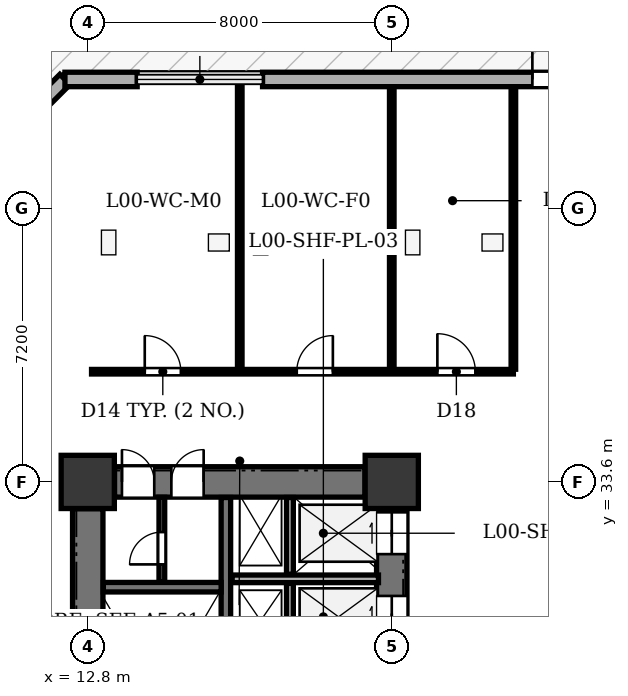
"""IFC4 building model, lengths in metres.
Left out: names, types, materials, properties, quantities, classifications, styles, units other than length and angle.
Written with IfcOpenShell. Run it as: python <this file> out.ifc"""

import sys

from ifc_helpers import new_model, si_unit, direction, frame, frame_2d, origin, origin_2d, place, context, subcontext, project, spatial, rectangle, extrude, element, fill, save


model = new_model("IFC4")
c1 = context("Model", 3, precision=1e-05, world=origin(), true_north=direction((0.0, 1.0)))
c2 = subcontext(c1, "Body", "Model", "MODEL_VIEW")
j1 = project(units=[si_unit("LENGTHUNIT", "METRE"), si_unit("PLANEANGLEUNIT", "RADIAN")], contexts=[c1])
p1 = place(None, origin())
s1 = spatial("IfcSite", under=j1, at=p1, CompositionType="ELEMENT")
p2 = place(p1, origin())
s2 = spatial("IfcBuilding", under=s1, at=p2, CompositionType="ELEMENT")
p3 = place(p2, origin())
s3 = spatial("IfcBuildingStorey", under=s2, at=p3, CompositionType="ELEMENT", Elevation=0.0)
for number, where, z_axis, x_axis in (
    (1, (12.8, 33.6, 0.0), (0.0, 0.0, 1.0), (1.0, 0.0, 0.0)),
    (2, (20.8, 33.6, 0.0), (0.0, 0.0, 1.0), (1.0, 0.0, 0.0)),
):
    element("IfcColumn", number, at=place(p3, frame(where, z_axis=z_axis, x_axis=x_axis)), inside=s3, PredefinedType="COLUMN", context=c2, shape_type="SweptSolid", body=[
        extrude(rectangle(XDim=1.4, YDim=1.4, at=origin_2d()), origin(), (0.0, 0.0, 1.0), 5.4),
    ])
p4 = place(p3, frame((9.41, 41.4, 0.0), z_axis=(0.0, 0.0, 1.0), x_axis=(0.707106781187, 0.707106781187, 0.0)))
e3 = element("IfcWall", 3, at=p4, inside=s3, PredefinedType="STANDARD", context=c2, shape_type="SweptSolid", body=[
    extrude(rectangle(XDim=3.946, YDim=0.38, at=frame_2d((1.973, 0.0))), origin(), (0.0, 0.0, 1.0), 4.95),
])
p5 = place(p3, frame((12.2, 44.19, 0.0), z_axis=(0.0, 0.0, 1.0), x_axis=(1.0, 0.0, 0.0)))
e4 = element("IfcWall", 4, at=p5, inside=s3, PredefinedType="STANDARD", context=c2, shape_type="SweptSolid", body=[
    extrude(rectangle(XDim=1.9, YDim=0.38, at=frame_2d((0.95, 0.0))), origin(), (0.0, 0.0, 1.0), 3.135),
])
p6 = place(p3, frame((17.4, 44.19, 0.0), z_axis=(0.0, 0.0, 1.0), x_axis=(1.0, 0.0, 0.0)))
e5 = element("IfcWall", 5, at=p6, inside=s3, PredefinedType="STANDARD", context=c2, shape_type="SweptSolid", body=[
    extrude(rectangle(XDim=12.55, YDim=0.38, at=frame_2d((6.275, 0.0))), origin(), (0.0, 0.0, 1.0), 3.135),
])
p7 = place(p6, frame((7.1, 0.0, 0.0)))
e6 = element("IfcOpeningElement", 6, at=p7, cuts=e5, PredefinedType="OPENING", context=c2, shape_type="SweptSolid", body=[
    extrude(rectangle(XDim=1.8, YDim=2.3, at=frame_2d((0.9, 1.15))), frame((0.0, 0.2, 0.0), z_axis=(0.0, -1.0, 0.0), x_axis=(1.0, 0.0, 0.0)), (0.0, 0.0, 1.0), 0.4),
])
p8 = place(p3, frame((12.8, 21.505, 0.0), z_axis=(0.0, 0.0, 1.0), x_axis=(0.0, 1.0, 0.0)))
e7 = element("IfcWall", 7, at=p8, inside=s3, PredefinedType="SHEAR", context=c2, shape_type="SweptSolid", body=[
    extrude(rectangle(XDim=11.39, YDim=0.8, at=frame_2d((5.695, 0.0))), origin(), (0.0, 0.0, 1.0), 4.95),
])
p9 = place(p8, frame((2.345, 0.0, 0.0)))
e8 = element("IfcOpeningElement", 8, at=p9, cuts=e7, PredefinedType="OPENING", context=c2, shape_type="SweptSolid", body=[
    extrude(rectangle(XDim=1.15, YDim=2.15, at=frame_2d((0.575, 1.075))), frame((0.0, 0.41, 0.0), z_axis=(0.0, -1.0, 0.0), x_axis=(1.0, 0.0, 0.0)), (0.0, 0.0, 1.0), 0.82),
])
p10 = place(p3, frame((13.505, 33.6, 0.0), z_axis=(0.0, 0.0, 1.0), x_axis=(1.0, 0.0, 0.0)))
e9 = element("IfcWall", 9, at=p10, inside=s3, PredefinedType="SHEAR", context=c2, shape_type="SweptSolid", body=[
    extrude(rectangle(XDim=6.59, YDim=0.8, at=frame_2d((3.295, 0.0))), origin(), (0.0, 0.0, 1.0), 4.95),
])
p11 = place(p10, frame((0.195, 0.0, 0.0)))
e10 = element("IfcOpeningElement", 10, at=p11, cuts=e9, PredefinedType="OPENING", context=c2, shape_type="SweptSolid", body=[
    extrude(rectangle(XDim=0.85, YDim=2.02, at=frame_2d((0.425, 1.01))), frame((0.0, 0.41, 0.0), z_axis=(0.0, -1.0, 0.0), x_axis=(1.0, 0.0, 0.0)), (0.0, 0.0, 1.0), 0.82),
])
p12 = place(p10, frame((1.495, 0.0, 0.0)))
e11 = element("IfcOpeningElement", 11, at=p12, cuts=e9, PredefinedType="OPENING", context=c2, shape_type="SweptSolid", body=[
    extrude(rectangle(XDim=0.85, YDim=2.02, at=frame_2d((0.425, 1.01))), frame((0.0, 0.41, 0.0), z_axis=(0.0, -1.0, 0.0), x_axis=(1.0, 0.0, 0.0)), (0.0, 0.0, 1.0), 0.82),
])
p13 = place(p3, frame((20.8, 21.505, 0.0), z_axis=(0.0, 0.0, 1.0), x_axis=(0.0, 1.0, 0.0)))
e12 = element("IfcWall", 12, at=p13, inside=s3, PredefinedType="SHEAR", context=c2, shape_type="SweptSolid", body=[
    extrude(rectangle(XDim=11.39, YDim=0.8, at=frame_2d((5.695, 0.0))), origin(), (0.0, 0.0, 1.0), 4.95),
])
p14 = place(p13, frame((1.095, 0.0, 0.0)))
e13 = element("IfcOpeningElement", 13, at=p14, cuts=e12, PredefinedType="OPENING", context=c2, shape_type="SweptSolid", body=[
    extrude(rectangle(XDim=1.2, YDim=2.15, at=frame_2d((0.6, 1.075))), frame((0.0, 0.41, 0.0), z_axis=(0.0, -1.0, 0.0), x_axis=(1.0, 0.0, 0.0)), (0.0, 0.0, 1.0), 0.82),
])
p15 = place(p13, frame((4.095, 0.0, 0.0)))
e14 = element("IfcOpeningElement", 14, at=p15, cuts=e12, PredefinedType="OPENING", context=c2, shape_type="SweptSolid", body=[
    extrude(rectangle(XDim=1.1, YDim=2.1, at=frame_2d((0.55, 1.05))), frame((0.0, 0.41, 0.0), z_axis=(0.0, -1.0, 0.0), x_axis=(1.0, 0.0, 0.0)), (0.0, 0.0, 1.0), 0.82),
])
p16 = place(p13, frame((6.045, 0.0, 0.0)))
e15 = element("IfcOpeningElement", 15, at=p16, cuts=e12, PredefinedType="OPENING", context=c2, shape_type="SweptSolid", body=[
    extrude(rectangle(XDim=1.1, YDim=2.1, at=frame_2d((0.55, 1.05))), frame((0.0, 0.41, 0.0), z_axis=(0.0, -1.0, 0.0), x_axis=(1.0, 0.0, 0.0)), (0.0, 0.0, 1.0), 0.82),
])
p17 = place(p13, frame((7.995, 0.0, 0.0)))
e16 = element("IfcOpeningElement", 16, at=p17, cuts=e12, PredefinedType="OPENING", context=c2, shape_type="SweptSolid", body=[
    extrude(rectangle(XDim=1.1, YDim=2.1, at=frame_2d((0.55, 1.05))), frame((0.0, 0.41, 0.0), z_axis=(0.0, -1.0, 0.0), x_axis=(1.0, 0.0, 0.0)), (0.0, 0.0, 1.0), 0.82),
])
p18 = place(p13, frame((10.195, 0.0, 0.0)))
e17 = element("IfcOpeningElement", 17, at=p18, cuts=e12, PredefinedType="OPENING", context=c2, shape_type="SweptSolid", body=[
    extrude(rectangle(XDim=1.1, YDim=2.1, at=frame_2d((0.55, 1.05))), frame((0.0, 0.41, 0.0), z_axis=(0.0, -1.0, 0.0), x_axis=(1.0, 0.0, 0.0)), (0.0, 0.0, 1.0), 0.82),
])
p19 = place(p3, frame((16.435, 21.21, 0.0), z_axis=(0.0, 0.0, 1.0), x_axis=(0.0, 1.0, 0.0)))
e18 = element("IfcWall", 18, at=p19, inside=s3, PredefinedType="SHEAR", context=c2, shape_type="SweptSolid", body=[
    extrude(rectangle(XDim=11.98, YDim=0.25, at=frame_2d((5.99, 0.0))), origin(), (0.0, 0.0, 1.0), 4.95),
])
p20 = place(p19, frame((0.44, 0.0, 0.0)))
e19 = element("IfcOpeningElement", 19, at=p20, cuts=e18, PredefinedType="OPENING", context=c2, shape_type="SweptSolid", body=[
    extrude(rectangle(XDim=1.2, YDim=2.15, at=frame_2d((0.6, 1.075))), frame((0.0, 0.135, 0.0), z_axis=(0.0, -1.0, 0.0), x_axis=(1.0, 0.0, 0.0)), (0.0, 0.0, 1.0), 0.27),
])
p21 = place(p19, frame((2.59, 0.0, 0.0)))
e20 = element("IfcOpeningElement", 20, at=p21, cuts=e18, PredefinedType="OPENING", context=c2, shape_type="SweptSolid", body=[
    extrude(rectangle(XDim=1.15, YDim=2.15, at=frame_2d((0.575, 1.075))), frame((0.0, 0.135, 0.0), z_axis=(0.0, -1.0, 0.0), x_axis=(1.0, 0.0, 0.0)), (0.0, 0.0, 1.0), 0.27),
])
p22 = place(p3, frame((13.21, 30.83, 0.0), z_axis=(0.0, 0.0, 1.0), x_axis=(1.0, 0.0, 0.0)))
e21 = element("IfcWall", 21, at=p22, inside=s3, PredefinedType="SHEAR", context=c2, shape_type="SweptSolid", body=[
    extrude(rectangle(XDim=3.1, YDim=0.25, at=frame_2d((1.55, 0.0))), origin(), (0.0, 0.0, 1.0), 4.95),
])
p23 = place(p3, frame((16.6, 31.05, 0.0), z_axis=(0.0, 0.0, 1.0), x_axis=(1.0, 0.0, 0.0)))
e22 = element("IfcWall", 22, at=p23, inside=s3, PredefinedType="SOLIDWALL", context=c2, shape_type="SweptSolid", body=[
    extrude(rectangle(XDim=3.85, YDim=0.2, at=frame_2d((1.925, 0.0))), origin(), (0.0, 0.0, 1.0), 4.95),
])
p24 = place(p3, frame((18.12, 25.27, 0.0), z_axis=(0.0, 0.0, 1.0), x_axis=(0.0, 1.0, 0.0)))
e23 = element("IfcWall", 23, at=p24, inside=s3, PredefinedType="PARTITIONING", context=c2, shape_type="SweptSolid", body=[
    extrude(rectangle(XDim=5.66, YDim=0.18, at=frame_2d((2.83, 0.0))), origin(), (0.0, 0.0, 1.0), 4.95),
])
p25 = place(p3, frame((18.12, 31.17, 0.0), z_axis=(0.0, 0.0, 1.0), x_axis=(0.0, 1.0, 0.0)))
e24 = element("IfcWall", 24, at=p25, inside=s3, PredefinedType="PARTITIONING", context=c2, shape_type="SweptSolid", body=[
    extrude(rectangle(XDim=2.02, YDim=0.18, at=frame_2d((1.01, 0.0))), origin(), (0.0, 0.0, 1.0), 4.95),
])
p26 = place(p3, frame((14.75, 30.96, 0.0), z_axis=(0.0, 0.0, 1.0), x_axis=(0.0, 1.0, 0.0)))
e25 = element("IfcWall", 25, at=p26, inside=s3, PredefinedType="PARTITIONING", context=c2, shape_type="SweptSolid", body=[
    extrude(rectangle(XDim=2.235, YDim=0.15, at=frame_2d((1.118, 0.0))), origin(), (0.0, 0.0, 1.0), 4.95),
])
p27 = place(p26, frame((0.47, 0.0, 0.0)))
e26 = element("IfcOpeningElement", 26, at=p27, cuts=e25, PredefinedType="OPENING", context=c2, shape_type="SweptSolid", body=[
    extrude(rectangle(XDim=0.85, YDim=2.02, at=frame_2d((0.425, 1.01))), frame((0.0, 0.085, 0.0), z_axis=(0.0, -1.0, 0.0), x_axis=(1.0, 0.0, 0.0)), (0.0, 0.0, 1.0), 0.17),
])
p28 = place(p3, frame((12.9, 36.5, 0.0), z_axis=(0.0, 0.0, 1.0), x_axis=(1.0, 0.0, 0.0)))
e27 = element("IfcWall", 27, at=p28, inside=s3, PredefinedType="PARTITIONING", context=c2, shape_type="SweptSolid", body=[
    extrude(rectangle(XDim=11.1, YDim=0.12, at=frame_2d((5.55, 0.0))), origin(), (0.0, 0.0, 1.0), 4.95),
])
p29 = place(p28, frame((1.4, 0.0, 0.0)))
e28 = element("IfcOpeningElement", 28, at=p29, cuts=e27, PredefinedType="OPENING", context=c2, shape_type="SweptSolid", body=[
    extrude(rectangle(XDim=0.95, YDim=2.1, at=frame_2d((0.475, 1.05))), frame((0.0, 0.07, 0.0), z_axis=(0.0, -1.0, 0.0), x_axis=(1.0, 0.0, 0.0)), (0.0, 0.0, 1.0), 0.14),
])
p30 = place(p28, frame((5.4, 0.0, 0.0)))
e29 = element("IfcOpeningElement", 29, at=p30, cuts=e27, PredefinedType="OPENING", context=c2, shape_type="SweptSolid", body=[
    extrude(rectangle(XDim=0.95, YDim=2.1, at=frame_2d((0.475, 1.05))), frame((0.0, 0.07, 0.0), z_axis=(0.0, -1.0, 0.0), x_axis=(1.0, 0.0, 0.0)), (0.0, 0.0, 1.0), 0.14),
])
p31 = place(p28, frame((9.1, 0.0, 0.0)))
e30 = element("IfcOpeningElement", 30, at=p31, cuts=e27, PredefinedType="OPENING", context=c2, shape_type="SweptSolid", body=[
    extrude(rectangle(XDim=1.0, YDim=2.1, at=frame_2d((0.5, 1.05))), frame((0.0, 0.07, 0.0), z_axis=(0.0, -1.0, 0.0), x_axis=(1.0, 0.0, 0.0)), (0.0, 0.0, 1.0), 0.14),
])
p32 = place(p3, frame((16.8, 36.58, 0.0), z_axis=(0.0, 0.0, 1.0), x_axis=(0.0, 1.0, 0.0)))
e31 = element("IfcWall", 31, at=p32, inside=s3, PredefinedType="PARTITIONING", context=c2, shape_type="SweptSolid", body=[
    extrude(rectangle(XDim=7.495, YDim=0.12, at=frame_2d((3.748, 0.0))), origin(), (0.0, 0.0, 1.0), 4.95),
])
p33 = place(p3, frame((20.8, 36.58, 0.0), z_axis=(0.0, 0.0, 1.0), x_axis=(0.0, 1.0, 0.0)))
e32 = element("IfcWall", 32, at=p33, inside=s3, PredefinedType="PARTITIONING", context=c2, shape_type="SweptSolid", body=[
    extrude(rectangle(XDim=7.415, YDim=0.12, at=frame_2d((3.708, 0.0))), origin(), (0.0, 0.0, 1.0), 3.135),
])
p34 = place(p3, frame((24.0, 36.565, 0.0), z_axis=(0.0, 0.0, 1.0), x_axis=(0.0, 1.0, 0.0)))
e33 = element("IfcWall", 33, at=p34, inside=s3, PredefinedType="PARTITIONING", context=c2, shape_type="SweptSolid", body=[
    extrude(rectangle(XDim=7.43, YDim=0.12, at=frame_2d((3.715, 0.0))), origin(), (0.0, 0.0, 1.0), 4.95),
])
p35 = place(p7, origin())
e34 = element("IfcDoor", 34, at=p35, inside=s3, OperationType="DOUBLE_DOOR_SINGLE_SWING", PredefinedType="DOOR", context=c2, shape_type="SweptSolid", body=[
    extrude(rectangle(XDim=1.8, YDim=2.3, at=frame_2d((0.9, 1.15))), frame((0.0, 0.025, 0.0), z_axis=(0.0, -1.0, 0.0), x_axis=(1.0, 0.0, 0.0)), (0.0, 0.0, 1.0), 0.05),
])
fill(e6, e34)
p36 = place(p11, origin())
e35 = element("IfcDoor", 35, at=p36, inside=s3, OperationType="SINGLE_SWING_LEFT", PredefinedType="DOOR", context=c2, shape_type="SweptSolid", body=[
    extrude(rectangle(XDim=0.85, YDim=2.02, at=frame_2d((0.425, 1.01))), frame((0.0, 0.025, 0.0), z_axis=(0.0, -1.0, 0.0), x_axis=(1.0, 0.0, 0.0)), (0.0, 0.0, 1.0), 0.05),
])
fill(e10, e35)
p37 = place(p12, origin())
e36 = element("IfcDoor", 36, at=p37, inside=s3, OperationType="SINGLE_SWING_RIGHT", PredefinedType="DOOR", context=c2, shape_type="SweptSolid", body=[
    extrude(rectangle(XDim=0.85, YDim=2.02, at=frame_2d((0.425, 1.01))), frame((0.0, 0.025, 0.0), z_axis=(0.0, -1.0, 0.0), x_axis=(1.0, 0.0, 0.0)), (0.0, 0.0, 1.0), 0.05),
])
fill(e11, e36)
p38 = place(p17, origin())
e37 = element("IfcDoor", 37, at=p38, inside=s3, OperationType="DOUBLE_DOOR_SLIDING", PredefinedType="DOOR", context=c2, shape_type="SweptSolid", body=[
    extrude(rectangle(XDim=1.1, YDim=2.1, at=frame_2d((0.55, 1.05))), frame((0.0, 0.025, 0.0), z_axis=(0.0, -1.0, 0.0), x_axis=(1.0, 0.0, 0.0)), (0.0, 0.0, 1.0), 0.05),
])
fill(e16, e37)
p39 = place(p18, origin())
e38 = element("IfcDoor", 38, at=p39, inside=s3, OperationType="DOUBLE_DOOR_SLIDING", PredefinedType="DOOR", context=c2, shape_type="SweptSolid", body=[
    extrude(rectangle(XDim=1.1, YDim=2.1, at=frame_2d((0.55, 1.05))), frame((0.0, 0.025, 0.0), z_axis=(0.0, -1.0, 0.0), x_axis=(1.0, 0.0, 0.0)), (0.0, 0.0, 1.0), 0.05),
])
fill(e17, e38)
p40 = place(p27, origin())
e39 = element("IfcDoor", 39, at=p40, inside=s3, OperationType="SINGLE_SWING_LEFT", PredefinedType="DOOR", context=c2, shape_type="SweptSolid", body=[
    extrude(rectangle(XDim=0.85, YDim=2.02, at=frame_2d((0.425, 1.01))), frame((0.0, 0.025, 0.0), z_axis=(0.0, -1.0, 0.0), x_axis=(1.0, 0.0, 0.0)), (0.0, 0.0, 1.0), 0.05),
])
fill(e26, e39)
p41 = place(p29, origin())
e40 = element("IfcDoor", 40, at=p41, inside=s3, OperationType="SINGLE_SWING_LEFT", PredefinedType="DOOR", context=c2, shape_type="SweptSolid", body=[
    extrude(rectangle(XDim=0.95, YDim=2.1, at=frame_2d((0.475, 1.05))), frame((0.0, 0.025, 0.0), z_axis=(0.0, -1.0, 0.0), x_axis=(1.0, 0.0, 0.0)), (0.0, 0.0, 1.0), 0.05),
])
fill(e28, e40)
p42 = place(p30, origin())
e41 = element("IfcDoor", 41, at=p42, inside=s3, OperationType="SINGLE_SWING_RIGHT", PredefinedType="DOOR", context=c2, shape_type="SweptSolid", body=[
    extrude(rectangle(XDim=0.95, YDim=2.1, at=frame_2d((0.475, 1.05))), frame((0.0, 0.025, 0.0), z_axis=(0.0, -1.0, 0.0), x_axis=(1.0, 0.0, 0.0)), (0.0, 0.0, 1.0), 0.05),
])
fill(e29, e41)
p43 = place(p31, origin())
e42 = element("IfcDoor", 42, at=p43, inside=s3, OperationType="SINGLE_SWING_LEFT", PredefinedType="DOOR", context=c2, shape_type="SweptSolid", body=[
    extrude(rectangle(XDim=1.0, YDim=2.1, at=frame_2d((0.5, 1.05))), frame((0.0, 0.025, 0.0), z_axis=(0.0, -1.0, 0.0), x_axis=(1.0, 0.0, 0.0)), (0.0, 0.0, 1.0), 0.05),
])
fill(e30, e42)
save(model, sys.argv[1])
